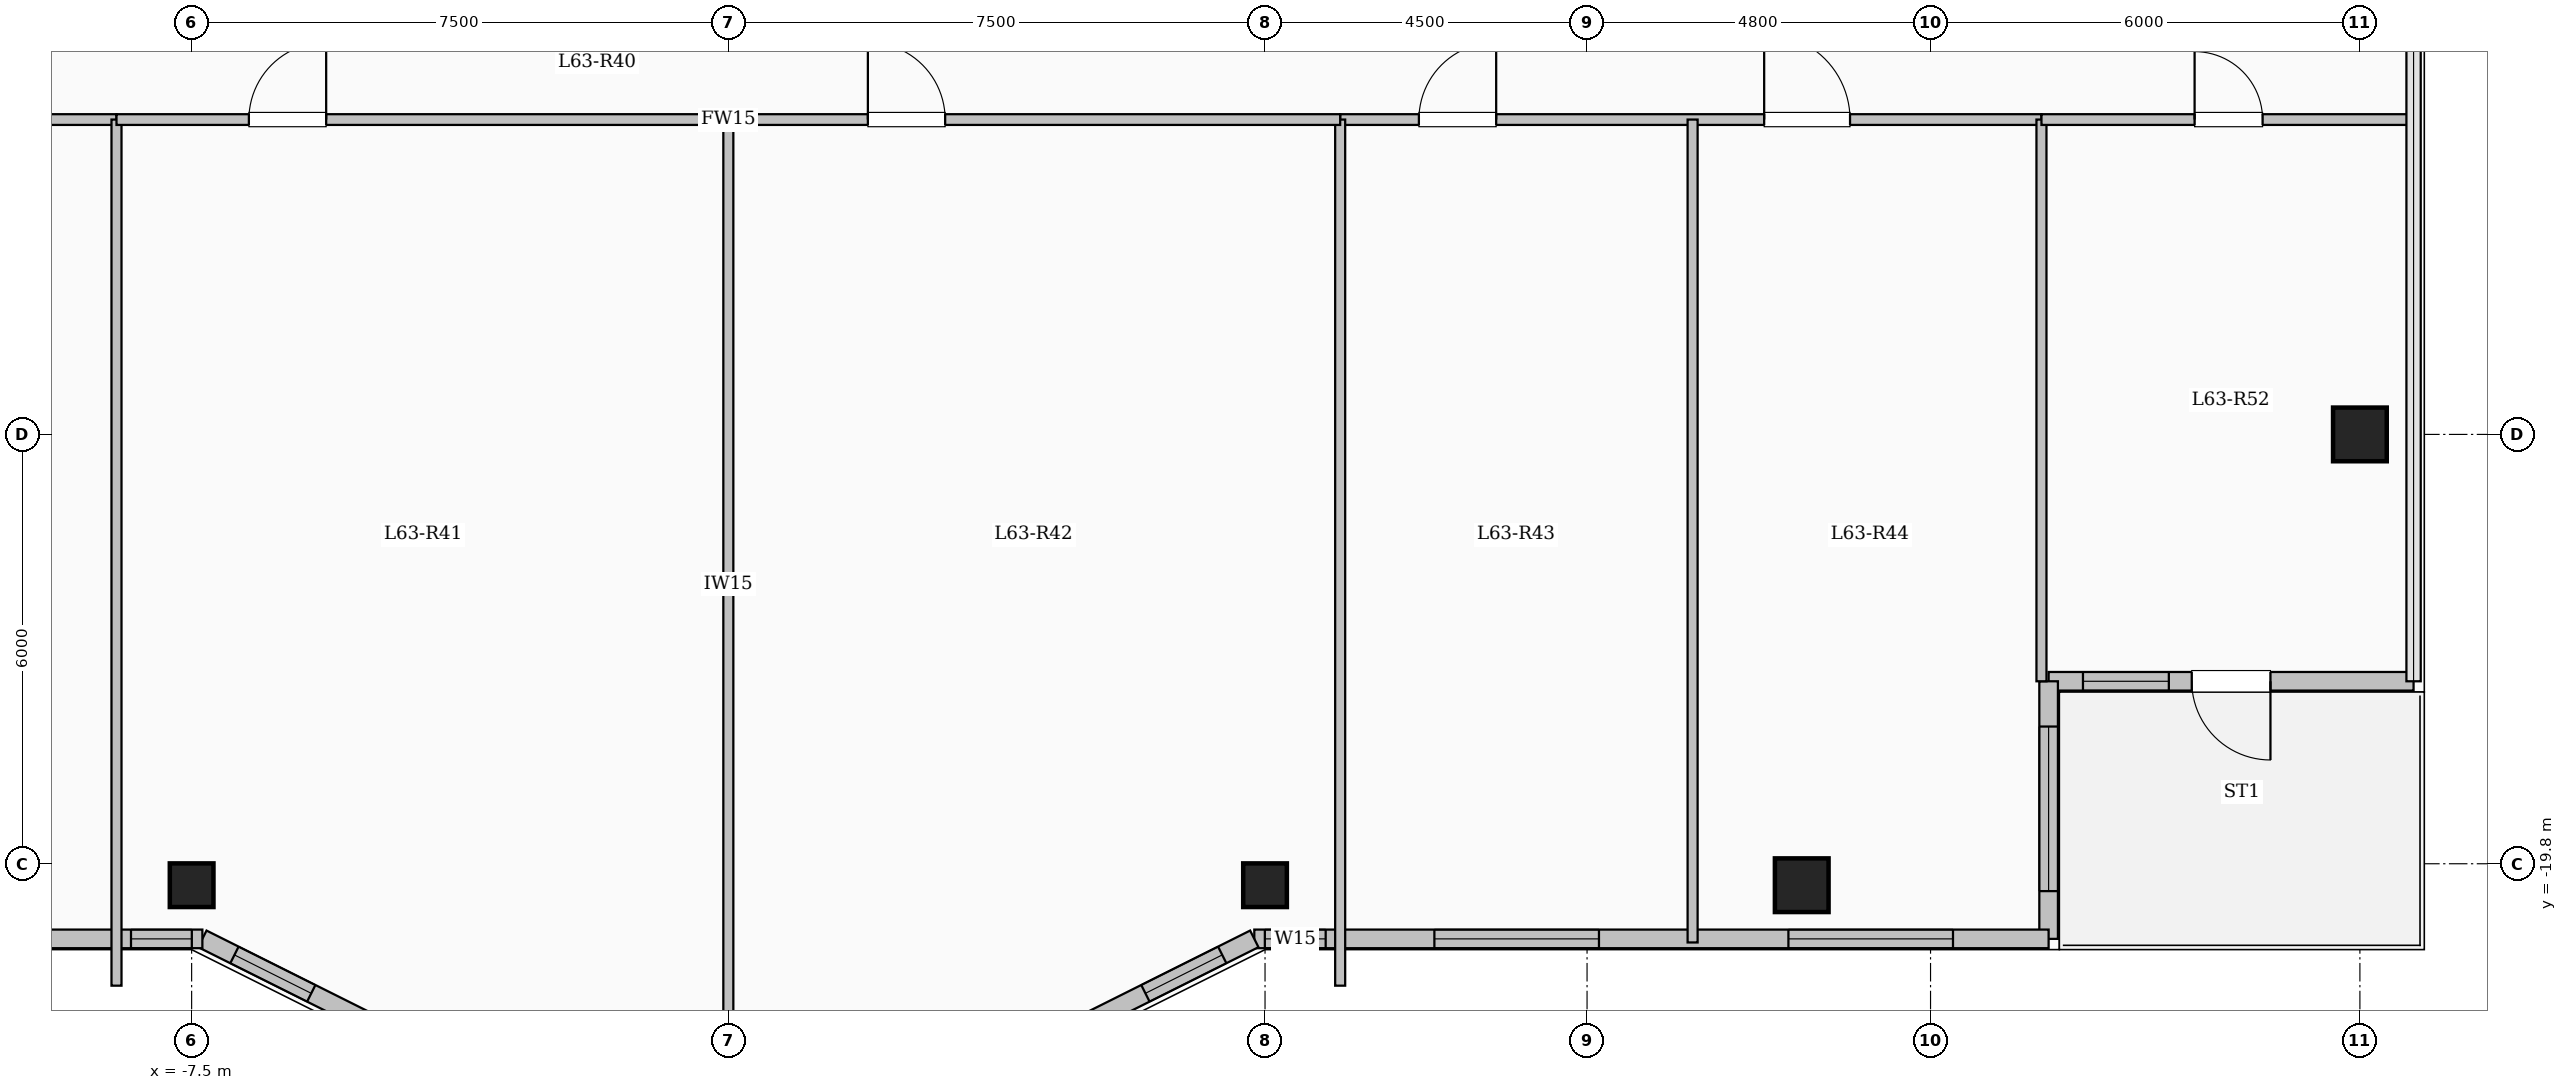
"""IFC4 building model, lengths in metres.
Left out: names, types, materials, properties, quantities, classifications, styles, units other than length and angle.
Written with IfcOpenShell. Run it as: python <this file> out.ifc"""

import sys

from ifc_helpers import new_model, si_unit, direction, frame, frame_2d, origin, origin_2d, place, context, subcontext, project, spatial, rectangle, hollow_circle, extrude, element, fill, save


model = new_model("IFC4")
c1 = context("Model", 3, precision=1e-05, world=origin(), true_north=direction((0.0, 1.0)))
c2 = subcontext(c1, "Body", "Model", "MODEL_VIEW")
j1 = project(units=[si_unit("LENGTHUNIT", "METRE"), si_unit("PLANEANGLEUNIT", "RADIAN")], contexts=[c1])
p1 = place(None, origin())
s1 = spatial("IfcSite", under=j1, at=p1, CompositionType="ELEMENT")
p2 = place(p1, origin())
s2 = spatial("IfcBuilding", under=s1, at=p2, CompositionType="ELEMENT")
p3 = place(p2, frame((0.0, 0.0, 231.75)))
s3 = spatial("IfcBuildingStorey", under=s2, at=p3, CompositionType="ELEMENT", Elevation=231.75)
for number, where, z_axis, x_axis in (
    (1, (-7.5, -20.1, 0.0), (0.0, 0.0, 1.0), (1.0, 0.0, 0.0)),
    (2, (7.5, -20.1, 0.0), (0.0, 0.0, 1.0), (1.0, 0.0, 0.0)),
):
    element("IfcColumn", number, at=place(p3, frame(where, z_axis=z_axis, x_axis=x_axis)), inside=s3, PredefinedType="COLUMN", context=c2, shape_type="SweptSolid", body=[
        extrude(hollow_circle(Radius=0.305, WallThickness=0.025, at=origin_2d()), origin(), (0.0, 0.0, 1.0), 4.65),
    ])
for number, where, z_axis, x_axis in (
    (3, (15.0, -20.1, 0.0), (0.0, 0.0, 1.0), (1.0, 0.0, 0.0)),
    (4, (22.8, -13.8, 0.0), (0.0, 0.0, 1.0), (1.0, 0.0, 0.0)),
):
    element("IfcColumn", number, at=place(p3, frame(where, z_axis=z_axis, x_axis=x_axis)), inside=s3, PredefinedType="COLUMN", context=c2, shape_type="SweptSolid", body=[
        extrude(rectangle(XDim=0.75, YDim=0.75, at=origin_2d()), origin(), (0.0, 0.0, 1.0), 4.65),
    ])
p4 = place(p3, frame((23.55, -17.25, 0.0), z_axis=(0.0, 0.0, 1.0), x_axis=(-1.0, 0.0, 0.0)))
e5 = element("IfcWall", 5, at=p4, inside=s3, PredefinedType="SOLIDWALL", context=c2, shape_type="SweptSolid", body=[
    extrude(rectangle(XDim=5.1, YDim=0.26, at=frame_2d((2.55, 0.0))), origin(), (0.0, 0.0, 1.0), 4.35),
])
p5 = place(p4, frame((2.0, 0.0, 0.0)))
e6 = element("IfcOpeningElement", 6, at=p5, cuts=e5, PredefinedType="OPENING", context=c2, shape_type="SweptSolid", body=[
    extrude(rectangle(XDim=1.1, YDim=2.2, at=frame_2d((0.55, 1.1))), frame((0.0, 0.14, 0.0), z_axis=(0.0, -1.0, 0.0), x_axis=(1.0, 0.0, 0.0)), (0.0, 0.0, 1.0), 0.28),
])
p6 = place(p4, frame((3.42, 0.0, 0.95)))
e7 = element("IfcOpeningElement", 7, at=p6, cuts=e5, PredefinedType="OPENING", context=c2, shape_type="SweptSolid", body=[
    extrude(rectangle(XDim=1.2, YDim=1.5, at=frame_2d((0.6, 0.75))), frame((0.0, 0.14, 0.0), z_axis=(0.0, -1.0, 0.0), x_axis=(1.0, 0.0, 0.0)), (0.0, 0.0, 1.0), 0.28),
])
p7 = place(p3, frame((18.45, -17.25, 0.0), z_axis=(0.0, 0.0, 1.0), x_axis=(0.0, -1.0, 0.0)))
e8 = element("IfcWall", 8, at=p7, inside=s3, PredefinedType="SOLIDWALL", context=c2, shape_type="SweptSolid", body=[
    extrude(rectangle(XDim=3.6, YDim=0.26, at=frame_2d((1.8, 0.0))), origin(), (0.0, 0.0, 1.0), 4.35),
])
p8 = place(p7, frame((0.633, 0.0, 0.85)))
e9 = element("IfcOpeningElement", 9, at=p8, cuts=e8, PredefinedType="OPENING", context=c2, shape_type="SweptSolid", body=[
    extrude(rectangle(XDim=2.3, YDim=2.2, at=frame_2d((1.15, 1.1))), frame((0.0, 0.14, 0.0), z_axis=(0.0, -1.0, 0.0), x_axis=(1.0, 0.0, 0.0)), (0.0, 0.0, 1.0), 0.28),
])
p9 = place(p3, frame((18.45, -20.85, 0.0), z_axis=(0.0, 0.0, 1.0), x_axis=(-1.0, 0.0, 0.0)))
e10 = element("IfcWall", 10, at=p9, inside=s3, PredefinedType="SOLIDWALL", context=c2, shape_type="SweptSolid", body=[
    extrude(rectangle(XDim=11.1, YDim=0.26, at=frame_2d((5.55, 0.0))), origin(), (0.0, 0.0, 1.0), 4.35),
])
p10 = place(p9, frame((1.336, 0.0, 0.85)))
e11 = element("IfcOpeningElement", 11, at=p10, cuts=e10, PredefinedType="OPENING", context=c2, shape_type="SweptSolid", body=[
    extrude(rectangle(XDim=2.3, YDim=2.2, at=frame_2d((1.15, 1.1))), frame((0.0, 0.14, 0.0), z_axis=(0.0, -1.0, 0.0), x_axis=(1.0, 0.0, 0.0)), (0.0, 0.0, 1.0), 0.28),
])
p11 = place(p9, frame((6.283, 0.0, 0.85)))
e12 = element("IfcOpeningElement", 12, at=p11, cuts=e10, PredefinedType="OPENING", context=c2, shape_type="SweptSolid", body=[
    extrude(rectangle(XDim=2.3, YDim=2.2, at=frame_2d((1.15, 1.1))), frame((0.0, 0.14, 0.0), z_axis=(0.0, -1.0, 0.0), x_axis=(1.0, 0.0, 0.0)), (0.0, 0.0, 1.0), 0.28),
])
p12 = place(p9, frame((10.103, 0.0, 0.95)))
e13 = element("IfcOpeningElement", 13, at=p12, cuts=e10, PredefinedType="OPENING", context=c2, shape_type="SweptSolid", body=[
    extrude(rectangle(XDim=0.85, YDim=1.5, at=frame_2d((0.425, 0.75))), frame((0.0, 0.14, 0.0), z_axis=(0.0, -1.0, 0.0), x_axis=(1.0, 0.0, 0.0)), (0.0, 0.0, 1.0), 0.28),
])
p13 = place(p3, frame((7.35, -20.85, 0.0), z_axis=(0.0, 0.0, 1.0), x_axis=(-0.894427191, -0.4472135955, 0.0)))
e14 = element("IfcWall", 14, at=p13, inside=s3, PredefinedType="SOLIDWALL", context=c2, shape_type="SweptSolid", body=[
    extrude(rectangle(XDim=3.354, YDim=0.26, at=frame_2d((1.677, 0.0))), origin(), (0.0, 0.0, 1.0), 4.35),
])
p14 = place(p13, frame((0.501, 0.0, 0.95)))
e15 = element("IfcOpeningElement", 15, at=p14, cuts=e14, PredefinedType="OPENING", context=c2, shape_type="SweptSolid", body=[
    extrude(rectangle(XDim=1.2, YDim=1.5, at=frame_2d((0.6, 0.75))), frame((0.0, 0.14, 0.0), z_axis=(0.0, -1.0, 0.0), x_axis=(1.0, 0.0, 0.0)), (0.0, 0.0, 1.0), 0.28),
])
p15 = place(p3, frame((-4.35, -22.35, 0.0), z_axis=(0.0, 0.0, 1.0), x_axis=(-0.894427191, 0.4472135955, 0.0)))
e16 = element("IfcWall", 16, at=p15, inside=s3, PredefinedType="SOLIDWALL", context=c2, shape_type="SweptSolid", body=[
    extrude(rectangle(XDim=3.354, YDim=0.26, at=frame_2d((1.677, 0.0))), origin(), (0.0, 0.0, 1.0), 4.35),
])
p16 = place(p15, frame((1.653, 0.0, 0.95)))
e17 = element("IfcOpeningElement", 17, at=p16, cuts=e16, PredefinedType="OPENING", context=c2, shape_type="SweptSolid", body=[
    extrude(rectangle(XDim=1.2, YDim=1.5, at=frame_2d((0.6, 0.75))), frame((0.0, 0.14, 0.0), z_axis=(0.0, -1.0, 0.0), x_axis=(1.0, 0.0, 0.0)), (0.0, 0.0, 1.0), 0.28),
])
p17 = place(p3, frame((-7.35, -20.85, 0.0), z_axis=(0.0, 0.0, 1.0), x_axis=(-1.0, 0.0, 0.0)))
e18 = element("IfcWall", 18, at=p17, inside=s3, PredefinedType="SOLIDWALL", context=c2, shape_type="SweptSolid", body=[
    extrude(rectangle(XDim=11.1, YDim=0.26, at=frame_2d((5.55, 0.0))), origin(), (0.0, 0.0, 1.0), 4.35),
])
p18 = place(p17, frame((0.147, 0.0, 0.95)))
e19 = element("IfcOpeningElement", 19, at=p18, cuts=e18, PredefinedType="OPENING", context=c2, shape_type="SweptSolid", body=[
    extrude(rectangle(XDim=0.85, YDim=1.5, at=frame_2d((0.425, 0.75))), frame((0.0, 0.14, 0.0), z_axis=(0.0, -1.0, 0.0), x_axis=(1.0, 0.0, 0.0)), (0.0, 0.0, 1.0), 0.28),
])
p19 = place(p17, frame((2.215, 0.0, 0.85)))
e20 = element("IfcOpeningElement", 20, at=p19, cuts=e18, PredefinedType="OPENING", context=c2, shape_type="SweptSolid", body=[
    extrude(rectangle(XDim=2.3, YDim=2.2, at=frame_2d((1.15, 1.1))), frame((0.0, 0.14, 0.0), z_axis=(0.0, -1.0, 0.0), x_axis=(1.0, 0.0, 0.0)), (0.0, 0.0, 1.0), 0.28),
])
p20 = place(p17, frame((7.162, 0.0, 0.85)))
e21 = element("IfcOpeningElement", 21, at=p20, cuts=e18, PredefinedType="OPENING", context=c2, shape_type="SweptSolid", body=[
    extrude(rectangle(XDim=2.3, YDim=2.2, at=frame_2d((1.15, 1.1))), frame((0.0, 0.14, 0.0), z_axis=(0.0, -1.0, 0.0), x_axis=(1.0, 0.0, 0.0)), (0.0, 0.0, 1.0), 0.28),
])
p21 = place(p3, frame((-18.35, -9.4, 0.0), z_axis=(0.0, 0.0, 1.0), x_axis=(1.0, 0.0, 0.0)))
e22 = element("IfcWall", 22, at=p21, inside=s3, PredefinedType="PARTITIONING", context=c2, shape_type="SweptSolid", body=[
    extrude(rectangle(XDim=9.8, YDim=0.15, at=frame_2d((4.9, 0.0))), origin(), (0.0, 0.0, 1.0), 4.35),
])
p22 = place(p21, frame((1.1, 0.0, 0.0)))
e23 = element("IfcOpeningElement", 23, at=p22, cuts=e22, PredefinedType="OPENING", context=c2, shape_type="SweptSolid", body=[
    extrude(rectangle(XDim=1.08, YDim=2.15, at=frame_2d((0.54, 1.075))), frame((0.0, 0.085, 0.0), z_axis=(0.0, -1.0, 0.0), x_axis=(1.0, 0.0, 0.0)), (0.0, 0.0, 1.0), 0.17),
])
p23 = place(p21, frame((6.36, 0.0, 0.0)))
e24 = element("IfcOpeningElement", 24, at=p23, cuts=e22, PredefinedType="OPENING", context=c2, shape_type="SweptSolid", body=[
    extrude(rectangle(XDim=1.08, YDim=2.15, at=frame_2d((0.54, 1.075))), frame((0.0, 0.085, 0.0), z_axis=(0.0, -1.0, 0.0), x_axis=(1.0, 0.0, 0.0)), (0.0, 0.0, 1.0), 0.17),
])
p24 = place(p3, frame((8.55, -9.4, 0.0), z_axis=(0.0, 0.0, 1.0), x_axis=(1.0, 0.0, 0.0)))
e25 = element("IfcWall", 25, at=p24, inside=s3, PredefinedType="PARTITIONING", context=c2, shape_type="SweptSolid", body=[
    extrude(rectangle(XDim=9.8, YDim=0.15, at=frame_2d((4.9, 0.0))), origin(), (0.0, 0.0, 1.0), 4.35),
])
p25 = place(p24, frame((1.1, 0.0, 0.0)))
e26 = element("IfcOpeningElement", 26, at=p25, cuts=e25, PredefinedType="OPENING", context=c2, shape_type="SweptSolid", body=[
    extrude(rectangle(XDim=1.08, YDim=2.15, at=frame_2d((0.54, 1.075))), frame((0.0, 0.085, 0.0), z_axis=(0.0, -1.0, 0.0), x_axis=(1.0, 0.0, 0.0)), (0.0, 0.0, 1.0), 0.17),
])
p26 = place(p24, frame((5.925, 0.0, 0.0)))
e27 = element("IfcOpeningElement", 27, at=p26, cuts=e25, PredefinedType="OPENING", context=c2, shape_type="SweptSolid", body=[
    extrude(rectangle(XDim=1.2, YDim=2.15, at=frame_2d((0.6, 1.075))), frame((0.0, 0.085, 0.0), z_axis=(0.0, -1.0, 0.0), x_axis=(1.0, 0.0, 0.0)), (0.0, 0.0, 1.0), 0.17),
])
for number, where, z_axis, x_axis in (
    (28, (-8.55, -21.504, 0.0), (0.0, 0.0, 1.0), (0.0, 1.0, 0.0)),
    (29, (8.55, -21.504, 0.0), (0.0, 0.0, 1.0), (0.0, 1.0, 0.0)),
):
    element("IfcWall", number, at=place(p3, frame(where, z_axis=z_axis, x_axis=x_axis)), inside=s3, PredefinedType="PARTITIONING", context=c2, shape_type="SweptSolid", body=[
        extrude(rectangle(XDim=12.104, YDim=0.14, at=frame_2d((6.052, 0.0))), origin(), (0.0, 0.0, 1.0), 4.35),
    ])
p27 = place(p3, frame((13.475, -20.9, 0.0), z_axis=(0.0, 0.0, 1.0), x_axis=(0.0, 1.0, 0.0)))
e30 = element("IfcWall", 30, at=p27, inside=s3, PredefinedType="PARTITIONING", context=c2, shape_type="SweptSolid", body=[
    extrude(rectangle(XDim=11.5, YDim=0.14, at=frame_2d((5.75, 0.0))), origin(), (0.0, 0.0, 1.0), 4.35),
])
p28 = place(p3, frame((-8.55, -9.4, 0.0), z_axis=(0.0, 0.0, 1.0), x_axis=(1.0, 0.0, 0.0)))
e31 = element("IfcWall", 31, at=p28, inside=s3, PredefinedType="PARTITIONING", context=c2, shape_type="SweptSolid", body=[
    extrude(rectangle(XDim=17.1, YDim=0.15, at=frame_2d((8.55, 0.0))), origin(), (0.0, 0.0, 1.0), 4.35),
])
p29 = place(p28, frame((1.85, 0.0, 0.0)))
e32 = element("IfcOpeningElement", 32, at=p29, cuts=e31, PredefinedType="OPENING", context=c2, shape_type="SweptSolid", body=[
    extrude(rectangle(XDim=1.08, YDim=2.15, at=frame_2d((0.54, 1.075))), frame((0.0, 0.085, 0.0), z_axis=(0.0, -1.0, 0.0), x_axis=(1.0, 0.0, 0.0)), (0.0, 0.0, 1.0), 0.17),
])
p30 = place(p28, frame((10.5, 0.0, 0.0)))
e33 = element("IfcOpeningElement", 33, at=p30, cuts=e31, PredefinedType="OPENING", context=c2, shape_type="SweptSolid", body=[
    extrude(rectangle(XDim=1.08, YDim=2.15, at=frame_2d((0.54, 1.075))), frame((0.0, 0.085, 0.0), z_axis=(0.0, -1.0, 0.0), x_axis=(1.0, 0.0, 0.0)), (0.0, 0.0, 1.0), 0.17),
])
p31 = place(p3, frame((0.0, -22.38, 0.0), z_axis=(0.0, 0.0, 1.0), x_axis=(0.0, 1.0, 0.0)))
e34 = element("IfcWall", 34, at=p31, inside=s3, PredefinedType="PARTITIONING", context=c2, shape_type="SweptSolid", body=[
    extrude(rectangle(XDim=12.98, YDim=0.14, at=frame_2d((6.49, 0.0))), origin(), (0.0, 0.0, 1.0), 4.35),
])
p32 = place(p3, frame((18.35, -17.25, 0.0), z_axis=(0.0, 0.0, 1.0), x_axis=(0.0, 1.0, 0.0)))
e35 = element("IfcWall", 35, at=p32, inside=s3, PredefinedType="PARTITIONING", context=c2, shape_type="SweptSolid", body=[
    extrude(rectangle(XDim=7.85, YDim=0.14, at=frame_2d((3.925, 0.0))), origin(), (0.0, 0.0, 1.0), 4.35),
])
p33 = place(p3, frame((18.35, -9.4, 0.0), z_axis=(0.0, 0.0, 1.0), x_axis=(1.0, 0.0, 0.0)))
e36 = element("IfcWall", 36, at=p33, inside=s3, PredefinedType="PARTITIONING", context=c2, shape_type="SweptSolid", body=[
    extrude(rectangle(XDim=5.23, YDim=0.15, at=frame_2d((2.615, 0.0))), origin(), (0.0, 0.0, 1.0), 4.35),
])
p34 = place(p33, frame((2.14, 0.0, 0.0)))
e37 = element("IfcOpeningElement", 37, at=p34, cuts=e36, PredefinedType="OPENING", context=c2, shape_type="SweptSolid", body=[
    extrude(rectangle(XDim=0.95, YDim=2.15, at=frame_2d((0.475, 1.075))), frame((0.0, 0.085, 0.0), z_axis=(0.0, -1.0, 0.0), x_axis=(1.0, 0.0, 0.0)), (0.0, 0.0, 1.0), 0.17),
])
p35 = place(p5, origin())
e38 = element("IfcDoor", 38, at=p35, inside=s3, OperationType="SINGLE_SWING_LEFT", PredefinedType="DOOR", context=c2, shape_type="SweptSolid", body=[
    extrude(rectangle(XDim=1.1, YDim=2.2, at=frame_2d((0.55, 1.1))), frame((0.0, 0.025, 0.0), z_axis=(0.0, -1.0, 0.0), x_axis=(1.0, 0.0, 0.0)), (0.0, 0.0, 1.0), 0.05),
])
fill(e6, e38)
p36 = place(p6, origin())
e39 = element("IfcWindow", 39, at=p36, inside=s3, PartitioningType="SINGLE_PANEL", PredefinedType="WINDOW", context=c2, shape_type="SweptSolid", body=[
    extrude(rectangle(XDim=1.2, YDim=1.5, at=frame_2d((0.6, 0.75))), frame((0.0, 0.03, 0.0), z_axis=(0.0, -1.0, 0.0), x_axis=(1.0, 0.0, 0.0)), (0.0, 0.0, 1.0), 0.06),
])
fill(e7, e39)
p37 = place(p8, origin())
e40 = element("IfcWindow", 40, at=p37, inside=s3, PartitioningType="SINGLE_PANEL", PredefinedType="WINDOW", context=c2, shape_type="SweptSolid", body=[
    extrude(rectangle(XDim=2.3, YDim=2.2, at=frame_2d((1.15, 1.1))), frame((0.0, 0.03, 0.0), z_axis=(0.0, -1.0, 0.0), x_axis=(1.0, 0.0, 0.0)), (0.0, 0.0, 1.0), 0.06),
])
fill(e9, e40)
p38 = place(p10, origin())
e41 = element("IfcWindow", 41, at=p38, inside=s3, PartitioningType="SINGLE_PANEL", PredefinedType="WINDOW", context=c2, shape_type="SweptSolid", body=[
    extrude(rectangle(XDim=2.3, YDim=2.2, at=frame_2d((1.15, 1.1))), frame((0.0, 0.03, 0.0), z_axis=(0.0, -1.0, 0.0), x_axis=(1.0, 0.0, 0.0)), (0.0, 0.0, 1.0), 0.06),
])
fill(e11, e41)
p39 = place(p11, origin())
e42 = element("IfcWindow", 42, at=p39, inside=s3, PartitioningType="SINGLE_PANEL", PredefinedType="WINDOW", context=c2, shape_type="SweptSolid", body=[
    extrude(rectangle(XDim=2.3, YDim=2.2, at=frame_2d((1.15, 1.1))), frame((0.0, 0.03, 0.0), z_axis=(0.0, -1.0, 0.0), x_axis=(1.0, 0.0, 0.0)), (0.0, 0.0, 1.0), 0.06),
])
fill(e12, e42)
p40 = place(p12, origin())
e43 = element("IfcWindow", 43, at=p40, inside=s3, PartitioningType="SINGLE_PANEL", PredefinedType="WINDOW", context=c2, shape_type="SweptSolid", body=[
    extrude(rectangle(XDim=0.85, YDim=1.5, at=frame_2d((0.425, 0.75))), frame((0.0, 0.03, 0.0), z_axis=(0.0, -1.0, 0.0), x_axis=(1.0, 0.0, 0.0)), (0.0, 0.0, 1.0), 0.06),
])
fill(e13, e43)
p41 = place(p14, origin())
e44 = element("IfcWindow", 44, at=p41, inside=s3, PartitioningType="SINGLE_PANEL", PredefinedType="WINDOW", context=c2, shape_type="SweptSolid", body=[
    extrude(rectangle(XDim=1.2, YDim=1.5, at=frame_2d((0.6, 0.75))), frame((0.0, 0.03, 0.0), z_axis=(0.0, -1.0, 0.0), x_axis=(1.0, 0.0, 0.0)), (0.0, 0.0, 1.0), 0.06),
])
fill(e15, e44)
p42 = place(p16, origin())
e45 = element("IfcWindow", 45, at=p42, inside=s3, PartitioningType="SINGLE_PANEL", PredefinedType="WINDOW", context=c2, shape_type="SweptSolid", body=[
    extrude(rectangle(XDim=1.2, YDim=1.5, at=frame_2d((0.6, 0.75))), frame((0.0, 0.03, 0.0), z_axis=(0.0, -1.0, 0.0), x_axis=(1.0, 0.0, 0.0)), (0.0, 0.0, 1.0), 0.06),
])
fill(e17, e45)
p43 = place(p18, origin())
e46 = element("IfcWindow", 46, at=p43, inside=s3, PartitioningType="SINGLE_PANEL", PredefinedType="WINDOW", context=c2, shape_type="SweptSolid", body=[
    extrude(rectangle(XDim=0.85, YDim=1.5, at=frame_2d((0.425, 0.75))), frame((0.0, 0.03, 0.0), z_axis=(0.0, -1.0, 0.0), x_axis=(1.0, 0.0, 0.0)), (0.0, 0.0, 1.0), 0.06),
])
fill(e19, e46)
p44 = place(p29, origin())
e47 = element("IfcDoor", 47, at=p44, inside=s3, OperationType="SINGLE_SWING_RIGHT", PredefinedType="DOOR", context=c2, shape_type="SweptSolid", body=[
    extrude(rectangle(XDim=1.08, YDim=2.15, at=frame_2d((0.54, 1.075))), frame((0.0, 0.025, 0.0), z_axis=(0.0, -1.0, 0.0), x_axis=(1.0, 0.0, 0.0)), (0.0, 0.0, 1.0), 0.05),
])
fill(e32, e47)
p45 = place(p30, origin())
e48 = element("IfcDoor", 48, at=p45, inside=s3, OperationType="SINGLE_SWING_LEFT", PredefinedType="DOOR", context=c2, shape_type="SweptSolid", body=[
    extrude(rectangle(XDim=1.08, YDim=2.15, at=frame_2d((0.54, 1.075))), frame((0.0, 0.025, 0.0), z_axis=(0.0, -1.0, 0.0), x_axis=(1.0, 0.0, 0.0)), (0.0, 0.0, 1.0), 0.05),
])
fill(e33, e48)
p46 = place(p25, origin())
e49 = element("IfcDoor", 49, at=p46, inside=s3, OperationType="SINGLE_SWING_RIGHT", PredefinedType="DOOR", context=c2, shape_type="SweptSolid", body=[
    extrude(rectangle(XDim=1.08, YDim=2.15, at=frame_2d((0.54, 1.075))), frame((0.0, 0.025, 0.0), z_axis=(0.0, -1.0, 0.0), x_axis=(1.0, 0.0, 0.0)), (0.0, 0.0, 1.0), 0.05),
])
fill(e26, e49)
p47 = place(p26, origin())
e50 = element("IfcDoor", 50, at=p47, inside=s3, OperationType="SINGLE_SWING_LEFT", PredefinedType="DOOR", context=c2, shape_type="SweptSolid", body=[
    extrude(rectangle(XDim=1.2, YDim=2.15, at=frame_2d((0.6, 1.075))), frame((0.0, 0.025, 0.0), z_axis=(0.0, -1.0, 0.0), x_axis=(1.0, 0.0, 0.0)), (0.0, 0.0, 1.0), 0.05),
])
fill(e27, e50)
p48 = place(p34, origin())
e51 = element("IfcDoor", 51, at=p48, inside=s3, OperationType="SINGLE_SWING_LEFT", PredefinedType="DOOR", context=c2, shape_type="SweptSolid", body=[
    extrude(rectangle(XDim=0.95, YDim=2.15, at=frame_2d((0.475, 1.075))), frame((0.0, 0.025, 0.0), z_axis=(0.0, -1.0, 0.0), x_axis=(1.0, 0.0, 0.0)), (0.0, 0.0, 1.0), 0.05),
])
fill(e37, e51)
save(model, sys.argv[1])
